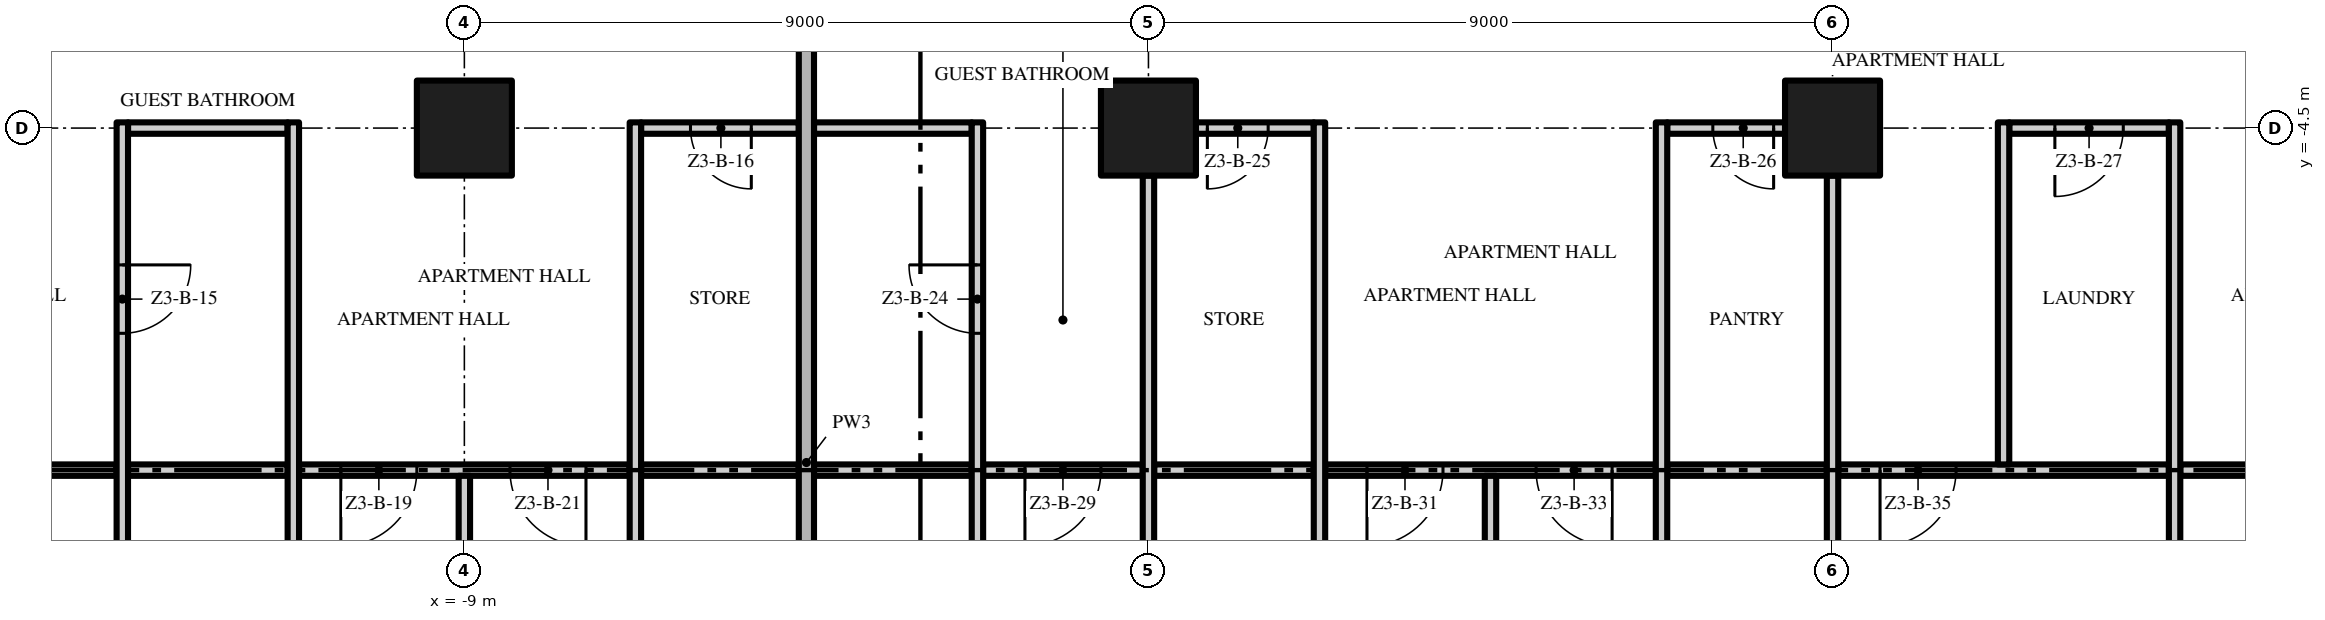
"""IFC4 building model, lengths in metres.
Left out: names, types, materials, properties, quantities, classifications, styles, units other than length and angle.
Written with IfcOpenShell. Run it as: python <this file> out.ifc"""

import sys

from ifc_helpers import new_model, si_unit, direction, frame, frame_2d, origin, origin_2d, place, context, subcontext, project, spatial, rectangle, extrude, element, fill, save


model = new_model("IFC4")
c1 = context("Model", 3, precision=1e-05, world=origin(), true_north=direction((0.0, 1.0)))
c2 = subcontext(c1, "Body", "Model", "MODEL_VIEW")
j1 = project(units=[si_unit("LENGTHUNIT", "METRE"), si_unit("PLANEANGLEUNIT", "RADIAN")], contexts=[c1])
p1 = place(None, origin())
s1 = spatial("IfcSite", under=j1, at=p1, CompositionType="ELEMENT")
p2 = place(p1, origin())
s2 = spatial("IfcBuilding", under=s1, at=p2, CompositionType="ELEMENT")
p3 = place(p2, frame((0.0, 0.0, 140.2)))
s3 = spatial("IfcBuildingStorey", under=s2, at=p3, CompositionType="ELEMENT", Elevation=140.2)
for number, where, z_axis, x_axis in (
    (1, (-9.0, -4.5, 0.0), (0.0, 0.0, 1.0), (1.0, 0.0, 0.0)),
    (2, (0.0, -4.5, 0.0), (0.0, 0.0, 1.0), (1.0, 0.0, 0.0)),
    (3, (9.0, -4.5, 0.0), (0.0, 0.0, 1.0), (1.0, 0.0, 0.0)),
):
    element("IfcColumn", number, at=place(p3, frame(where, z_axis=z_axis, x_axis=x_axis)), inside=s3, PredefinedType="COLUMN", context=c2, shape_type="SweptSolid", body=[
        extrude(rectangle(XDim=1.25, YDim=1.25, at=origin_2d()), origin(), (0.0, 0.0, 1.0), 3.5),
    ])
p4 = place(p3, frame((-13.575, -9.0, 0.0), z_axis=(0.0, 0.0, 1.0), x_axis=(-1.0, 0.0, 0.0)))
e4 = element("IfcWall", 4, at=p4, inside=s3, PredefinedType="PARTITIONING", context=c2, shape_type="SweptSolid", body=[
    extrude(rectangle(XDim=8.625, YDim=0.15, at=frame_2d((4.312, 0.0))), origin(), (0.0, 0.0, 1.0), 3.5),
])
p5 = place(p4, frame((0.925, 0.0, 0.0)))
e5 = element("IfcOpeningElement", 5, at=p5, cuts=e4, PredefinedType="OPENING", context=c2, shape_type="SweptSolid", body=[
    extrude(rectangle(XDim=1.8, YDim=2.4, at=frame_2d((0.9, 1.2))), frame((0.0, 0.085, 0.0), z_axis=(0.0, -1.0, 0.0), x_axis=(1.0, 0.0, 0.0)), (0.0, 0.0, 1.0), 0.17),
])
p6 = place(p3, frame((-13.425, -9.0, 0.0), z_axis=(0.0, 0.0, 1.0), x_axis=(1.0, 0.0, 0.0)))
e6 = element("IfcWall", 6, at=p6, inside=s3, PredefinedType="PARTITIONING", context=c2, shape_type="SweptSolid", body=[
    extrude(rectangle(XDim=2.1, YDim=0.15, at=frame_2d((1.05, 0.0))), origin(), (0.0, 0.0, 1.0), 3.5),
])
p7 = place(p3, frame((-6.825, -9.0, 0.0), z_axis=(0.0, 0.0, 1.0), x_axis=(-1.0, 0.0, 0.0)))
e7 = element("IfcWall", 7, at=p7, inside=s3, PredefinedType="PARTITIONING", context=c2, shape_type="SweptSolid", body=[
    extrude(rectangle(XDim=4.35, YDim=0.15, at=frame_2d((2.175, 0.0))), origin(), (0.0, 0.0, 1.0), 3.5),
])
p8 = place(p7, frame((2.8, 0.0, 0.0)))
e8 = element("IfcOpeningElement", 8, at=p8, cuts=e7, PredefinedType="OPENING", context=c2, shape_type="SweptSolid", body=[
    extrude(rectangle(XDim=1.0, YDim=2.4, at=frame_2d((0.5, 1.2))), frame((0.0, 0.085, 0.0), z_axis=(0.0, -1.0, 0.0), x_axis=(1.0, 0.0, 0.0)), (0.0, 0.0, 1.0), 0.17),
])
p9 = place(p7, frame((0.575, 0.0, 0.0)))
e9 = element("IfcOpeningElement", 9, at=p9, cuts=e7, PredefinedType="OPENING", context=c2, shape_type="SweptSolid", body=[
    extrude(rectangle(XDim=1.0, YDim=2.4, at=frame_2d((0.5, 1.2))), frame((0.0, 0.085, 0.0), z_axis=(0.0, -1.0, 0.0), x_axis=(1.0, 0.0, 0.0)), (0.0, 0.0, 1.0), 0.17),
])
for number, where, z_axis, x_axis in (
    (10, (-6.675, -9.0, 0.0), (0.0, 0.0, 1.0), (1.0, 0.0, 0.0)),
    (11, (-4.4, -9.0, 0.0), (0.0, 0.0, 1.0), (1.0, 0.0, 0.0)),
):
    element("IfcWall", number, at=place(p3, frame(where, z_axis=z_axis, x_axis=x_axis)), inside=s3, PredefinedType="PARTITIONING", context=c2, shape_type="SweptSolid", body=[
        extrude(rectangle(XDim=2.075, YDim=0.15, at=frame_2d((1.038, 0.0))), origin(), (0.0, 0.0, 1.0), 3.5),
    ])
p10 = place(p3, frame((-0.075, -9.0, 0.0), z_axis=(0.0, 0.0, 1.0), x_axis=(-1.0, 0.0, 0.0)))
e12 = element("IfcWall", 12, at=p10, inside=s3, PredefinedType="PARTITIONING", context=c2, shape_type="SweptSolid", body=[
    extrude(rectangle(XDim=2.1, YDim=0.15, at=frame_2d((1.05, 0.0))), origin(), (0.0, 0.0, 1.0), 3.5),
])
p11 = place(p10, frame((0.55, 0.0, 0.0)))
e13 = element("IfcOpeningElement", 13, at=p11, cuts=e12, PredefinedType="OPENING", context=c2, shape_type="SweptSolid", body=[
    extrude(rectangle(XDim=1.0, YDim=2.4, at=frame_2d((0.5, 1.2))), frame((0.0, 0.085, 0.0), z_axis=(0.0, -1.0, 0.0), x_axis=(1.0, 0.0, 0.0)), (0.0, 0.0, 1.0), 0.17),
])
p12 = place(p3, frame((0.075, -9.0, 0.0), z_axis=(0.0, 0.0, 1.0), x_axis=(1.0, 0.0, 0.0)))
e14 = element("IfcWall", 14, at=p12, inside=s3, PredefinedType="PARTITIONING", context=c2, shape_type="SweptSolid", body=[
    extrude(rectangle(XDim=2.1, YDim=0.15, at=frame_2d((1.05, 0.0))), origin(), (0.0, 0.0, 1.0), 3.5),
])
p13 = place(p3, frame((6.675, -9.0, 0.0), z_axis=(0.0, 0.0, 1.0), x_axis=(-1.0, 0.0, 0.0)))
e15 = element("IfcWall", 15, at=p13, inside=s3, PredefinedType="PARTITIONING", context=c2, shape_type="SweptSolid", body=[
    extrude(rectangle(XDim=4.35, YDim=0.15, at=frame_2d((2.175, 0.0))), origin(), (0.0, 0.0, 1.0), 3.5),
])
p14 = place(p13, frame((2.8, 0.0, 0.0)))
e16 = element("IfcOpeningElement", 16, at=p14, cuts=e15, PredefinedType="OPENING", context=c2, shape_type="SweptSolid", body=[
    extrude(rectangle(XDim=1.0, YDim=2.4, at=frame_2d((0.5, 1.2))), frame((0.0, 0.085, 0.0), z_axis=(0.0, -1.0, 0.0), x_axis=(1.0, 0.0, 0.0)), (0.0, 0.0, 1.0), 0.17),
])
p15 = place(p13, frame((0.575, 0.0, 0.0)))
e17 = element("IfcOpeningElement", 17, at=p15, cuts=e15, PredefinedType="OPENING", context=c2, shape_type="SweptSolid", body=[
    extrude(rectangle(XDim=1.0, YDim=2.4, at=frame_2d((0.5, 1.2))), frame((0.0, 0.085, 0.0), z_axis=(0.0, -1.0, 0.0), x_axis=(1.0, 0.0, 0.0)), (0.0, 0.0, 1.0), 0.17),
])
p16 = place(p3, frame((6.825, -9.0, 0.0), z_axis=(0.0, 0.0, 1.0), x_axis=(1.0, 0.0, 0.0)))
e18 = element("IfcWall", 18, at=p16, inside=s3, PredefinedType="PARTITIONING", context=c2, shape_type="SweptSolid", body=[
    extrude(rectangle(XDim=2.1, YDim=0.15, at=frame_2d((1.05, 0.0))), origin(), (0.0, 0.0, 1.0), 3.5),
])
p17 = place(p3, frame((13.425, -9.0, 0.0), z_axis=(0.0, 0.0, 1.0), x_axis=(-1.0, 0.0, 0.0)))
e19 = element("IfcWall", 19, at=p17, inside=s3, PredefinedType="PARTITIONING", context=c2, shape_type="SweptSolid", body=[
    extrude(rectangle(XDim=4.35, YDim=0.15, at=frame_2d((2.175, 0.0))), origin(), (0.0, 0.0, 1.0), 3.5),
])
p18 = place(p17, frame((2.8, 0.0, 0.0)))
e20 = element("IfcOpeningElement", 20, at=p18, cuts=e19, PredefinedType="OPENING", context=c2, shape_type="SweptSolid", body=[
    extrude(rectangle(XDim=1.0, YDim=2.4, at=frame_2d((0.5, 1.2))), frame((0.0, 0.085, 0.0), z_axis=(0.0, -1.0, 0.0), x_axis=(1.0, 0.0, 0.0)), (0.0, 0.0, 1.0), 0.17),
])
p19 = place(p3, frame((22.2, -9.0, 0.0), z_axis=(0.0, 0.0, 1.0), x_axis=(-1.0, 0.0, 0.0)))
e21 = element("IfcWall", 21, at=p19, inside=s3, PredefinedType="PARTITIONING", context=c2, shape_type="SweptSolid", body=[
    extrude(rectangle(XDim=8.625, YDim=0.15, at=frame_2d((4.312, 0.0))), origin(), (0.0, 0.0, 1.0), 3.5),
])
p20 = place(p19, frame((5.925, 0.0, 0.0)))
e22 = element("IfcOpeningElement", 22, at=p20, cuts=e21, PredefinedType="OPENING", context=c2, shape_type="SweptSolid", body=[
    extrude(rectangle(XDim=1.8, YDim=2.4, at=frame_2d((0.9, 1.2))), frame((0.0, 0.085, 0.0), z_axis=(0.0, -1.0, 0.0), x_axis=(1.0, 0.0, 0.0)), (0.0, 0.0, 1.0), 0.17),
])
p21 = place(p3, frame((-13.425, -4.5, 0.0), z_axis=(0.0, 0.0, 1.0), x_axis=(1.0, 0.0, 0.0)))
e23 = element("IfcWall", 23, at=p21, inside=s3, PredefinedType="PARTITIONING", context=c2, shape_type="SweptSolid", body=[
    extrude(rectangle(XDim=2.1, YDim=0.15, at=frame_2d((1.05, 0.0))), origin(), (0.0, 0.0, 1.0), 3.5),
])
p22 = place(p3, frame((-4.6, -4.5, 0.0), z_axis=(0.0, 0.0, 1.0), x_axis=(-1.0, 0.0, 0.0)))
e24 = element("IfcWall", 24, at=p22, inside=s3, PredefinedType="PARTITIONING", context=c2, shape_type="SweptSolid", body=[
    extrude(rectangle(XDim=2.075, YDim=0.15, at=frame_2d((1.038, 0.0))), origin(), (0.0, 0.0, 1.0), 3.5),
])
p23 = place(p22, frame((0.625, 0.0, 0.0)))
e25 = element("IfcOpeningElement", 25, at=p23, cuts=e24, PredefinedType="OPENING", context=c2, shape_type="SweptSolid", body=[
    extrude(rectangle(XDim=0.8, YDim=2.0, at=frame_2d((0.4, 1.0))), frame((0.0, 0.085, 0.0), z_axis=(0.0, -1.0, 0.0), x_axis=(1.0, 0.0, 0.0)), (0.0, 0.0, 1.0), 0.17),
])
p24 = place(p3, frame((-4.4, -4.5, 0.0), z_axis=(0.0, 0.0, 1.0), x_axis=(1.0, 0.0, 0.0)))
e26 = element("IfcWall", 26, at=p24, inside=s3, PredefinedType="PARTITIONING", context=c2, shape_type="SweptSolid", body=[
    extrude(rectangle(XDim=2.075, YDim=0.15, at=frame_2d((1.038, 0.0))), origin(), (0.0, 0.0, 1.0), 3.5),
])
p25 = place(p3, frame((2.175, -4.5, 0.0), z_axis=(0.0, 0.0, 1.0), x_axis=(-1.0, 0.0, 0.0)))
e27 = element("IfcWall", 27, at=p25, inside=s3, PredefinedType="PARTITIONING", context=c2, shape_type="SweptSolid", body=[
    extrude(rectangle(XDim=1.55, YDim=0.15, at=frame_2d((0.775, 0.0))), origin(), (0.0, 0.0, 1.0), 3.5),
])
p26 = place(p25, frame((0.6, 0.0, 0.0)))
e28 = element("IfcOpeningElement", 28, at=p26, cuts=e27, PredefinedType="OPENING", context=c2, shape_type="SweptSolid", body=[
    extrude(rectangle(XDim=0.8, YDim=2.0, at=frame_2d((0.4, 1.0))), frame((0.0, 0.085, 0.0), z_axis=(0.0, -1.0, 0.0), x_axis=(1.0, 0.0, 0.0)), (0.0, 0.0, 1.0), 0.17),
])
p27 = place(p3, frame((8.375, -4.5, 0.0), z_axis=(0.0, 0.0, 1.0), x_axis=(-1.0, 0.0, 0.0)))
e29 = element("IfcWall", 29, at=p27, inside=s3, PredefinedType="PARTITIONING", context=c2, shape_type="SweptSolid", body=[
    extrude(rectangle(XDim=1.55, YDim=0.15, at=frame_2d((0.775, 0.0))), origin(), (0.0, 0.0, 1.0), 3.5),
])
p28 = place(p27, frame((0.15, 0.0, 0.0)))
e30 = element("IfcOpeningElement", 30, at=p28, cuts=e29, PredefinedType="OPENING", context=c2, shape_type="SweptSolid", body=[
    extrude(rectangle(XDim=0.8, YDim=2.0, at=frame_2d((0.4, 1.0))), frame((0.0, 0.085, 0.0), z_axis=(0.0, -1.0, 0.0), x_axis=(1.0, 0.0, 0.0)), (0.0, 0.0, 1.0), 0.17),
])
p29 = place(p3, frame((13.425, -4.5, 0.0), z_axis=(0.0, 0.0, 1.0), x_axis=(-1.0, 0.0, 0.0)))
e31 = element("IfcWall", 31, at=p29, inside=s3, PredefinedType="PARTITIONING", context=c2, shape_type="SweptSolid", body=[
    extrude(rectangle(XDim=2.1, YDim=0.15, at=frame_2d((1.05, 0.0))), origin(), (0.0, 0.0, 1.0), 3.5),
])
p30 = place(p29, frame((0.6, 0.0, 0.0)))
e32 = element("IfcOpeningElement", 32, at=p30, cuts=e31, PredefinedType="OPENING", context=c2, shape_type="SweptSolid", body=[
    extrude(rectangle(XDim=0.9, YDim=2.1, at=frame_2d((0.45, 1.05))), frame((0.0, 0.085, 0.0), z_axis=(0.0, -1.0, 0.0), x_axis=(1.0, 0.0, 0.0)), (0.0, 0.0, 1.0), 0.17),
])
p31 = place(p3, frame((-13.5, -4.425, 0.0), z_axis=(0.0, 0.0, 1.0), x_axis=(0.0, -1.0, 0.0)))
e33 = element("IfcWall", 33, at=p31, inside=s3, PredefinedType="PARTITIONING", context=c2, shape_type="SweptSolid", body=[
    extrude(rectangle(XDim=13.275, YDim=0.15, at=frame_2d((6.638, 0.0))), origin(), (0.0, 0.0, 1.0), 3.5),
])
p32 = place(p31, frame((1.875, 0.0, 0.0)))
e34 = element("IfcOpeningElement", 34, at=p32, cuts=e33, PredefinedType="OPENING", context=c2, shape_type="SweptSolid", body=[
    extrude(rectangle(XDim=0.9, YDim=2.1, at=frame_2d((0.45, 1.05))), frame((0.0, 0.085, 0.0), z_axis=(0.0, -1.0, 0.0), x_axis=(1.0, 0.0, 0.0)), (0.0, 0.0, 1.0), 0.17),
])
p33 = place(p3, frame((-11.25, -12.075, 0.0), z_axis=(0.0, 0.0, 1.0), x_axis=(0.0, 1.0, 0.0)))
e35 = element("IfcWall", 35, at=p33, inside=s3, PredefinedType="PARTITIONING", context=c2, shape_type="SweptSolid", body=[
    extrude(rectangle(XDim=7.65, YDim=0.15, at=frame_2d((3.825, 0.0))), origin(), (0.0, 0.0, 1.0), 3.5),
])
p34 = place(p3, frame((-9.0, -12.875, 0.0), z_axis=(0.0, 0.0, 1.0), x_axis=(0.0, 1.0, 0.0)))
e36 = element("IfcWall", 36, at=p34, inside=s3, PredefinedType="PARTITIONING", context=c2, shape_type="SweptSolid", body=[
    extrude(rectangle(XDim=3.8, YDim=0.15, at=frame_2d((1.9, 0.0))), origin(), (0.0, 0.0, 1.0), 3.5),
])
p35 = place(p3, frame((-6.75, -12.075, 0.0), z_axis=(0.0, 0.0, 1.0), x_axis=(0.0, 1.0, 0.0)))
e37 = element("IfcWall", 37, at=p35, inside=s3, PredefinedType="PARTITIONING", context=c2, shape_type="SweptSolid", body=[
    extrude(rectangle(XDim=7.65, YDim=0.15, at=frame_2d((3.825, 0.0))), origin(), (0.0, 0.0, 1.0), 3.5),
])
p36 = place(p3, frame((-4.5, -17.7, 0.0), z_axis=(0.0, 0.0, 1.0), x_axis=(0.0, 1.0, 0.0)))
e38 = element("IfcWall", 38, at=p36, inside=s3, PredefinedType="PARTITIONING", context=c2, shape_type="SweptSolid", body=[
    extrude(rectangle(XDim=17.6, YDim=0.2, at=frame_2d((8.8, 0.0))), origin(), (0.0, 0.0, 1.0), 3.5),
])
p37 = place(p3, frame((-2.25, -12.075, 0.0), z_axis=(0.0, 0.0, 1.0), x_axis=(0.0, 1.0, 0.0)))
e39 = element("IfcWall", 39, at=p37, inside=s3, PredefinedType="PARTITIONING", context=c2, shape_type="SweptSolid", body=[
    extrude(rectangle(XDim=7.65, YDim=0.15, at=frame_2d((3.825, 0.0))), origin(), (0.0, 0.0, 1.0), 3.5),
])
p38 = place(p37, frame((4.875, 0.0, 0.0)))
e40 = element("IfcOpeningElement", 40, at=p38, cuts=e39, PredefinedType="OPENING", context=c2, shape_type="SweptSolid", body=[
    extrude(rectangle(XDim=0.9, YDim=2.1, at=frame_2d((0.45, 1.05))), frame((0.0, 0.085, 0.0), z_axis=(0.0, -1.0, 0.0), x_axis=(1.0, 0.0, 0.0)), (0.0, 0.0, 1.0), 0.17),
])
p39 = place(p37, frame((1.125, 0.0, 0.0)))
e41 = element("IfcOpeningElement", 41, at=p39, cuts=e39, PredefinedType="OPENING", context=c2, shape_type="SweptSolid", body=[
    extrude(rectangle(XDim=0.9, YDim=2.1, at=frame_2d((0.45, 1.05))), frame((0.0, 0.085, 0.0), z_axis=(0.0, -1.0, 0.0), x_axis=(1.0, 0.0, 0.0)), (0.0, 0.0, 1.0), 0.17),
])
p40 = place(p3, frame((0.0, -12.875, 0.0), z_axis=(0.0, 0.0, 1.0), x_axis=(0.0, 1.0, 0.0)))
e42 = element("IfcWall", 42, at=p40, inside=s3, PredefinedType="PARTITIONING", context=c2, shape_type="SweptSolid", body=[
    extrude(rectangle(XDim=7.75, YDim=0.15, at=frame_2d((3.875, 0.0))), origin(), (0.0, 0.0, 1.0), 3.5),
])
p41 = place(p3, frame((2.25, -12.075, 0.0), z_axis=(0.0, 0.0, 1.0), x_axis=(0.0, 1.0, 0.0)))
e43 = element("IfcWall", 43, at=p41, inside=s3, PredefinedType="PARTITIONING", context=c2, shape_type="SweptSolid", body=[
    extrude(rectangle(XDim=7.65, YDim=0.15, at=frame_2d((3.825, 0.0))), origin(), (0.0, 0.0, 1.0), 3.5),
])
p42 = place(p3, frame((4.5, -17.7, 0.0), z_axis=(0.0, 0.0, 1.0), x_axis=(0.0, 1.0, 0.0)))
e44 = element("IfcWall", 44, at=p42, inside=s3, PredefinedType="PARTITIONING", context=c2, shape_type="SweptSolid", body=[
    extrude(rectangle(XDim=8.625, YDim=0.15, at=frame_2d((4.312, 0.0))), origin(), (0.0, 0.0, 1.0), 3.5),
])
p43 = place(p3, frame((6.75, -12.075, 0.0), z_axis=(0.0, 0.0, 1.0), x_axis=(0.0, 1.0, 0.0)))
e45 = element("IfcWall", 45, at=p43, inside=s3, PredefinedType="PARTITIONING", context=c2, shape_type="SweptSolid", body=[
    extrude(rectangle(XDim=7.65, YDim=0.15, at=frame_2d((3.825, 0.0))), origin(), (0.0, 0.0, 1.0), 3.5),
])
p44 = place(p3, frame((9.0, -12.875, 0.0), z_axis=(0.0, 0.0, 1.0), x_axis=(0.0, 1.0, 0.0)))
e46 = element("IfcWall", 46, at=p44, inside=s3, PredefinedType="PARTITIONING", context=c2, shape_type="SweptSolid", body=[
    extrude(rectangle(XDim=7.75, YDim=0.15, at=frame_2d((3.875, 0.0))), origin(), (0.0, 0.0, 1.0), 3.5),
])
p45 = place(p3, frame((11.25, -8.925, 0.0), z_axis=(0.0, 0.0, 1.0), x_axis=(0.0, 1.0, 0.0)))
e47 = element("IfcWall", 47, at=p45, inside=s3, PredefinedType="PARTITIONING", context=c2, shape_type="SweptSolid", body=[
    extrude(rectangle(XDim=4.5, YDim=0.15, at=frame_2d((2.25, 0.0))), origin(), (0.0, 0.0, 1.0), 3.5),
])
p46 = place(p3, frame((13.5, -17.7, 0.0), z_axis=(0.0, 0.0, 1.0), x_axis=(0.0, 1.0, 0.0)))
e48 = element("IfcWall", 48, at=p46, inside=s3, PredefinedType="PARTITIONING", context=c2, shape_type="SweptSolid", body=[
    extrude(rectangle(XDim=13.275, YDim=0.15, at=frame_2d((6.638, 0.0))), origin(), (0.0, 0.0, 1.0), 3.5),
])
p47 = place(p32, origin())
e49 = element("IfcDoor", 49, at=p47, inside=s3, OperationType="SINGLE_SWING_LEFT", PredefinedType="DOOR", context=c2, shape_type="SweptSolid", body=[
    extrude(rectangle(XDim=0.9, YDim=2.1, at=frame_2d((0.45, 1.05))), frame((0.0, 0.025, 0.0), z_axis=(0.0, -1.0, 0.0), x_axis=(1.0, 0.0, 0.0)), (0.0, 0.0, 1.0), 0.05),
])
fill(e34, e49)
p48 = place(p23, origin())
e50 = element("IfcDoor", 50, at=p48, inside=s3, OperationType="SINGLE_SWING_LEFT", PredefinedType="DOOR", context=c2, shape_type="SweptSolid", body=[
    extrude(rectangle(XDim=0.8, YDim=2.0, at=frame_2d((0.4, 1.0))), frame((0.0, 0.025, 0.0), z_axis=(0.0, -1.0, 0.0), x_axis=(1.0, 0.0, 0.0)), (0.0, 0.0, 1.0), 0.05),
])
fill(e25, e50)
p49 = place(p8, origin())
e51 = element("IfcDoor", 51, at=p49, inside=s3, OperationType="SINGLE_SWING_RIGHT", PredefinedType="DOOR", context=c2, shape_type="SweptSolid", body=[
    extrude(rectangle(XDim=1.0, YDim=2.4, at=frame_2d((0.5, 1.2))), frame((0.0, 0.025, 0.0), z_axis=(0.0, -1.0, 0.0), x_axis=(1.0, 0.0, 0.0)), (0.0, 0.0, 1.0), 0.05),
])
fill(e8, e51)
p50 = place(p9, origin())
e52 = element("IfcDoor", 52, at=p50, inside=s3, OperationType="SINGLE_SWING_LEFT", PredefinedType="DOOR", context=c2, shape_type="SweptSolid", body=[
    extrude(rectangle(XDim=1.0, YDim=2.4, at=frame_2d((0.5, 1.2))), frame((0.0, 0.025, 0.0), z_axis=(0.0, -1.0, 0.0), x_axis=(1.0, 0.0, 0.0)), (0.0, 0.0, 1.0), 0.05),
])
fill(e9, e52)
p51 = place(p38, origin())
e53 = element("IfcDoor", 53, at=p51, inside=s3, OperationType="SINGLE_SWING_RIGHT", PredefinedType="DOOR", context=c2, shape_type="SweptSolid", body=[
    extrude(rectangle(XDim=0.9, YDim=2.1, at=frame_2d((0.45, 1.05))), frame((0.0, 0.025, 0.0), z_axis=(0.0, -1.0, 0.0), x_axis=(1.0, 0.0, 0.0)), (0.0, 0.0, 1.0), 0.05),
])
fill(e40, e53)
p52 = place(p26, origin())
e54 = element("IfcDoor", 54, at=p52, inside=s3, OperationType="SINGLE_SWING_RIGHT", PredefinedType="DOOR", context=c2, shape_type="SweptSolid", body=[
    extrude(rectangle(XDim=0.8, YDim=2.0, at=frame_2d((0.4, 1.0))), frame((0.0, 0.025, 0.0), z_axis=(0.0, -1.0, 0.0), x_axis=(1.0, 0.0, 0.0)), (0.0, 0.0, 1.0), 0.05),
])
fill(e28, e54)
p53 = place(p28, origin())
e55 = element("IfcDoor", 55, at=p53, inside=s3, OperationType="SINGLE_SWING_LEFT", PredefinedType="DOOR", context=c2, shape_type="SweptSolid", body=[
    extrude(rectangle(XDim=0.8, YDim=2.0, at=frame_2d((0.4, 1.0))), frame((0.0, 0.025, 0.0), z_axis=(0.0, -1.0, 0.0), x_axis=(1.0, 0.0, 0.0)), (0.0, 0.0, 1.0), 0.05),
])
fill(e30, e55)
p54 = place(p30, origin())
e56 = element("IfcDoor", 56, at=p54, inside=s3, OperationType="SINGLE_SWING_RIGHT", PredefinedType="DOOR", context=c2, shape_type="SweptSolid", body=[
    extrude(rectangle(XDim=0.9, YDim=2.1, at=frame_2d((0.45, 1.05))), frame((0.0, 0.025, 0.0), z_axis=(0.0, -1.0, 0.0), x_axis=(1.0, 0.0, 0.0)), (0.0, 0.0, 1.0), 0.05),
])
fill(e32, e56)
p55 = place(p11, origin())
e57 = element("IfcDoor", 57, at=p55, inside=s3, OperationType="SINGLE_SWING_RIGHT", PredefinedType="DOOR", context=c2, shape_type="SweptSolid", body=[
    extrude(rectangle(XDim=1.0, YDim=2.4, at=frame_2d((0.5, 1.2))), frame((0.0, 0.025, 0.0), z_axis=(0.0, -1.0, 0.0), x_axis=(1.0, 0.0, 0.0)), (0.0, 0.0, 1.0), 0.05),
])
fill(e13, e57)
p56 = place(p14, origin())
e58 = element("IfcDoor", 58, at=p56, inside=s3, OperationType="SINGLE_SWING_RIGHT", PredefinedType="DOOR", context=c2, shape_type="SweptSolid", body=[
    extrude(rectangle(XDim=1.0, YDim=2.4, at=frame_2d((0.5, 1.2))), frame((0.0, 0.025, 0.0), z_axis=(0.0, -1.0, 0.0), x_axis=(1.0, 0.0, 0.0)), (0.0, 0.0, 1.0), 0.05),
])
fill(e16, e58)
p57 = place(p15, origin())
e59 = element("IfcDoor", 59, at=p57, inside=s3, OperationType="SINGLE_SWING_LEFT", PredefinedType="DOOR", context=c2, shape_type="SweptSolid", body=[
    extrude(rectangle(XDim=1.0, YDim=2.4, at=frame_2d((0.5, 1.2))), frame((0.0, 0.025, 0.0), z_axis=(0.0, -1.0, 0.0), x_axis=(1.0, 0.0, 0.0)), (0.0, 0.0, 1.0), 0.05),
])
fill(e17, e59)
p58 = place(p18, origin())
e60 = element("IfcDoor", 60, at=p58, inside=s3, OperationType="SINGLE_SWING_RIGHT", PredefinedType="DOOR", context=c2, shape_type="SweptSolid", body=[
    extrude(rectangle(XDim=1.0, YDim=2.4, at=frame_2d((0.5, 1.2))), frame((0.0, 0.025, 0.0), z_axis=(0.0, -1.0, 0.0), x_axis=(1.0, 0.0, 0.0)), (0.0, 0.0, 1.0), 0.05),
])
fill(e20, e60)
save(model, sys.argv[1])
